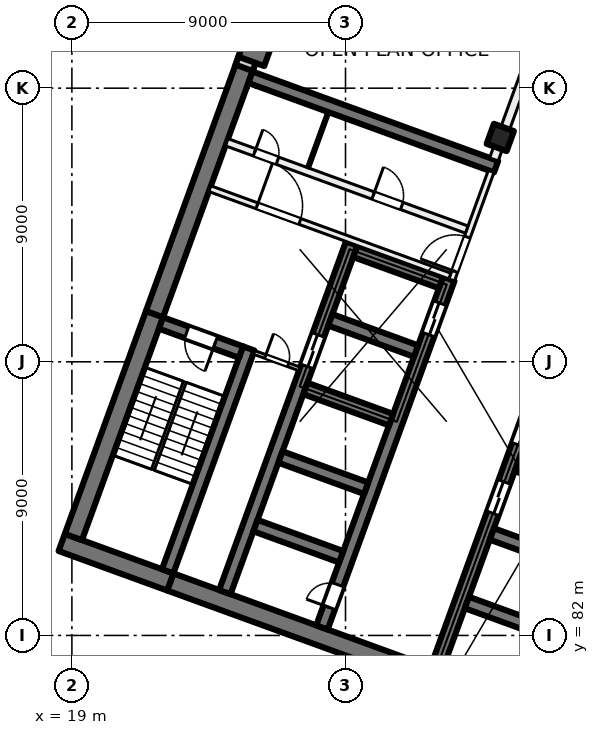
"""IFC4 building model, lengths in metres.
Left out: names, types, materials, properties, quantities, classifications, styles, units other than length and angle.
Written with IfcOpenShell. Run it as: python <this file> out.ifc"""

import sys

from ifc_helpers import new_model, si_unit, direction, frame, frame_2d, origin, origin_2d, place, context, subcontext, project, spatial, rectangle, extrude, element, fill, save


model = new_model("IFC4")
c1 = context("Model", 3, precision=1e-05, world=origin(), true_north=direction((0.0, 1.0)))
c2 = subcontext(c1, "Body", "Model", "MODEL_VIEW")
j1 = project(units=[si_unit("LENGTHUNIT", "METRE"), si_unit("PLANEANGLEUNIT", "RADIAN")], contexts=[c1])
p1 = place(None, origin())
s1 = spatial("IfcSite", under=j1, at=p1, CompositionType="ELEMENT")
p2 = place(p1, origin())
s2 = spatial("IfcBuilding", under=s1, at=p2, CompositionType="ELEMENT")
p3 = place(p2, frame((0.0, 0.0, 55.5)))
s3 = spatial("IfcBuildingStorey", under=s2, at=p3, CompositionType="ELEMENT", Elevation=55.5)
p4 = place(p3, frame((33.091, 98.379, 0.0), z_axis=(0.0, 0.0, 1.0), x_axis=(-0.342020143326, -0.939692620786, 0.0)))
e1 = element("IfcColumn", 1, at=p4, inside=s3, PredefinedType="COLUMN", context=c2, shape_type="SweptSolid", body=[
    extrude(rectangle(XDim=0.7, YDim=0.7, at=origin_2d()), origin(), (0.0, 0.0, 1.0), 4.0),
])
p5 = place(p3, frame((25.056, 101.303, 0.0), z_axis=(0.0, 0.0, 1.0), x_axis=(-0.342020143326, -0.939692620786, 0.0)))
e2 = element("IfcColumn", 2, at=p5, inside=s3, PredefinedType="COLUMN", context=c2, shape_type="SweptSolid", body=[
    extrude(rectangle(XDim=0.9, YDim=0.9, at=origin_2d()), origin(), (0.0, 0.0, 1.0), 4.0),
])
p6 = place(p3, frame((35.767, 78.835, 0.0), z_axis=(0.0, 0.0, 1.0), x_axis=(-0.939692894512, 0.342019391267, 0.0)))
e3 = element("IfcWall", 3, at=p6, inside=s3, PredefinedType="SHEAR", context=c2, shape_type="SweptSolid", body=[
    extrude(rectangle(XDim=14.4, YDim=0.6, at=frame_2d((7.2, 0.0))), origin(), (0.0, 0.0, 1.0), 4.0),
])
p7 = place(p3, frame((22.236, 83.76, 0.0), z_axis=(0.0, 0.0, 1.0), x_axis=(-0.939680822529, 0.342052557032, 0.0)))
e4 = element("IfcWall", 4, at=p7, inside=s3, PredefinedType="SHEAR", context=c2, shape_type="SweptSolid", body=[
    extrude(rectangle(XDim=3.8, YDim=0.6, at=frame_2d((1.9, 0.0))), origin(), (0.0, 0.0, 1.0), 4.0),
])
p8 = place(p3, frame((19.05, 85.239, 0.0), z_axis=(0.0, 0.0, 1.0), x_axis=(0.342016982193, 0.939693771338, 0.0)))
e5 = element("IfcWall", 5, at=p8, inside=s3, PredefinedType="SHEAR", context=c2, shape_type="SweptSolid", body=[
    extrude(rectangle(XDim=7.8, YDim=0.6, at=frame_2d((3.9, 0.0))), origin(), (0.0, 0.0, 1.0), 4.0),
])
p9 = place(p3, frame((21.717, 92.568, 0.0), z_axis=(0.0, 0.0, 1.0), x_axis=(0.342016162452, 0.939694069696, 0.0)))
e6 = element("IfcWall", 6, at=p9, inside=s3, PredefinedType="SHEAR", context=c2, shape_type="SweptSolid", body=[
    extrude(rectangle(XDim=8.9, YDim=0.6, at=frame_2d((4.45, 0.0))), origin(), (0.0, 0.0, 1.0), 4.0),
])
p10 = place(p3, frame((22.15, 84.11, 0.0), z_axis=(0.0, 0.0, 1.0), x_axis=(0.342016982193, 0.939693771338, 0.0)))
e7 = element("IfcWall", 7, at=p10, inside=s3, PredefinedType="SHEAR", context=c2, shape_type="SweptSolid", body=[
    extrude(rectangle(XDim=7.8, YDim=0.4, at=frame_2d((3.9, 0.0))), origin(), (0.0, 0.0, 1.0), 4.0),
])
p11 = place(p3, frame((24.562, 91.32, 0.0), z_axis=(0.0, 0.0, 1.0), x_axis=(-0.939717030584, 0.341953070509, 0.0)))
e8 = element("IfcWall", 8, at=p11, inside=s3, PredefinedType="SHEAR", context=c2, shape_type="SweptSolid", body=[
    extrude(rectangle(XDim=2.8, YDim=0.4, at=frame_2d((1.4, 0.0))), origin(), (0.0, 0.0, 1.0), 4.0),
])
p12 = place(p11, frame((0.9, 0.0, 0.0)))
e9 = element("IfcOpeningElement", 9, at=p12, cuts=e8, PredefinedType="OPENING", context=c2, shape_type="SweptSolid", body=[
    extrude(rectangle(XDim=1.0, YDim=2.1, at=frame_2d((0.5, 1.05))), frame((0.0, 0.21, 0.0), z_axis=(0.0, -1.0, 0.0), x_axis=(1.0, 0.0, 0.0)), (0.0, 0.0, 1.0), 0.42),
])
p13 = place(p3, frame((30.984, 80.895, 0.0), z_axis=(0.0, 0.0, 1.0), x_axis=(0.342021021735, 0.939692301071, 0.0)))
e10 = element("IfcWall", 10, at=p13, inside=s3, PredefinedType="SHEAR", context=c2, shape_type="SweptSolid", body=[
    extrude(rectangle(XDim=12.2, YDim=0.4, at=frame_2d((6.1, 0.0))), origin(), (0.0, 0.0, 1.0), 4.0),
])
p14 = place(p13, frame((5.45, 0.0, 0.0)))
e11 = element("IfcOpeningElement", 11, at=p14, cuts=e10, PredefinedType="OPENING", context=c2, shape_type="SweptSolid", body=[
    extrude(rectangle(XDim=1.1, YDim=2.1, at=frame_2d((0.55, 1.05))), frame((0.0, 0.21, 0.0), z_axis=(0.0, -1.0, 0.0), x_axis=(1.0, 0.0, 0.0)), (0.0, 0.0, 1.0), 0.42),
])
p15 = place(p13, frame((7.85, 0.0, 0.0)))
e12 = element("IfcOpeningElement", 12, at=p15, cuts=e10, PredefinedType="OPENING", context=c2, shape_type="SweptSolid", body=[
    extrude(rectangle(XDim=1.1, YDim=2.1, at=frame_2d((0.55, 1.05))), frame((0.0, 0.21, 0.0), z_axis=(0.0, -1.0, 0.0), x_axis=(1.0, 0.0, 0.0)), (0.0, 0.0, 1.0), 0.42),
])
p16 = place(p13, frame((10.25, 0.0, 0.0)))
e13 = element("IfcOpeningElement", 13, at=p16, cuts=e10, PredefinedType="OPENING", context=c2, shape_type="SweptSolid", body=[
    extrude(rectangle(XDim=1.1, YDim=2.1, at=frame_2d((0.55, 1.05))), frame((0.0, 0.21, 0.0), z_axis=(0.0, -1.0, 0.0), x_axis=(1.0, 0.0, 0.0)), (0.0, 0.0, 1.0), 0.42),
])
for number, where, z_axis, x_axis in (
    (14, (34.812, 82.056, 0.0), (0.0, 0.0, 1.0), (-0.94, 0.342, 0.0)),
    (15, (35.632, 84.311, 0.0), (0.0, 0.0, 1.0), (-0.94, 0.342, 0.0)),
    (16, (36.453, 86.566, 0.0), (0.0, 0.0, 1.0), (-0.94, 0.342, 0.0)),
):
    element("IfcWall", number, at=place(p3, frame(where, z_axis=z_axis, x_axis=x_axis)), inside=s3, PredefinedType="SHEAR", context=c2, shape_type="SweptSolid", body=[
        extrude(rectangle(XDim=3.0, YDim=0.4, at=frame_2d((1.5, 0.0))), origin(), (0.0, 0.0, 1.0), 4.0),
    ])
p17 = place(p3, frame((27.225, 82.263, 0.0), z_axis=(0.0, 0.0, 1.0), x_axis=(0.342014590177, 0.939694641948, 0.0)))
e17 = element("IfcWall", 17, at=p17, inside=s3, PredefinedType="SHEAR", context=c2, shape_type="SweptSolid", body=[
    extrude(rectangle(XDim=12.2, YDim=0.4, at=frame_2d((6.1, 0.0))), origin(), (0.0, 0.0, 1.0), 4.0),
])
p18 = place(p17, frame((10.25, 0.0, 0.0)))
e18 = element("IfcOpeningElement", 18, at=p18, cuts=e17, PredefinedType="OPENING", context=c2, shape_type="SweptSolid", body=[
    extrude(rectangle(XDim=1.1, YDim=2.1, at=frame_2d((0.55, 1.05))), frame((0.0, 0.21, 0.0), z_axis=(0.0, -1.0, 0.0), x_axis=(1.0, 0.0, 0.0)), (0.0, 0.0, 1.0), 0.42),
])
p19 = place(p17, frame((0.7, 0.0, 0.0)))
e19 = element("IfcOpeningElement", 19, at=p19, cuts=e17, PredefinedType="OPENING", context=c2, shape_type="SweptSolid", body=[
    extrude(rectangle(XDim=0.8, YDim=2.1, at=frame_2d((0.4, 1.05))), frame((0.0, 0.21, 0.0), z_axis=(0.0, -1.0, 0.0), x_axis=(1.0, 0.0, 0.0)), (0.0, 0.0, 1.0), 0.42),
])
p20 = place(p3, frame((24.03, 83.426, 0.0), z_axis=(0.0, 0.0, 1.0), x_axis=(0.342014590177, 0.939694641948, 0.0)))
e20 = element("IfcWall", 20, at=p20, inside=s3, PredefinedType="SHEAR", context=c2, shape_type="SweptSolid", body=[
    extrude(rectangle(XDim=12.2, YDim=0.4, at=frame_2d((6.1, 0.0))), origin(), (0.0, 0.0, 1.0), 4.0),
])
p21 = place(p20, frame((7.9, 0.0, 0.0)))
e21 = element("IfcOpeningElement", 21, at=p21, cuts=e20, PredefinedType="OPENING", context=c2, shape_type="SweptSolid", body=[
    extrude(rectangle(XDim=1.1, YDim=2.1, at=frame_2d((0.55, 1.05))), frame((0.0, 0.21, 0.0), z_axis=(0.0, -1.0, 0.0), x_axis=(1.0, 0.0, 0.0)), (0.0, 0.0, 1.0), 0.42),
])
p22 = place(p3, frame((27.858, 84.587, 0.0), z_axis=(0.0, 0.0, 1.0), x_axis=(-0.939686455819, 0.342037080957, 0.0)))
e22 = element("IfcWall", 22, at=p22, inside=s3, PredefinedType="SHEAR", context=c2, shape_type="SweptSolid", body=[
    extrude(rectangle(XDim=3.0, YDim=0.4, at=frame_2d((1.5, 0.0))), origin(), (0.0, 0.0, 1.0), 4.0),
])
p23 = place(p3, frame((28.678, 86.842, 0.0), z_axis=(0.0, 0.0, 1.0), x_axis=(-0.939676934218, 0.342063238742, 0.0)))
e23 = element("IfcWall", 23, at=p23, inside=s3, PredefinedType="SHEAR", context=c2, shape_type="SweptSolid", body=[
    extrude(rectangle(XDim=3.0, YDim=0.4, at=frame_2d((1.5, 0.0))), origin(), (0.0, 0.0, 1.0), 4.0),
])
for number, where, z_axis, x_axis in (
    (24, (29.5, 89.097, 0.0), (0.0, 0.0, 1.0), (-0.94, 0.342, 0.0)),
    (25, (30.32, 91.353, 0.0), (0.0, 0.0, 1.0), (-0.94, 0.342, 0.0)),
    (26, (31.141, 93.608, 0.0), (0.0, 0.0, 1.0), (-0.94, 0.342, 0.0)),
):
    element("IfcWall", number, at=place(p3, frame(where, z_axis=z_axis, x_axis=x_axis)), inside=s3, PredefinedType="SHEAR", context=c2, shape_type="SweptSolid", body=[
        extrude(rectangle(XDim=3.0, YDim=0.4, at=frame_2d((1.5, 0.0))), origin(), (0.0, 0.0, 1.0), 4.0),
    ])
p24 = place(p3, frame((32.953, 97.418, 0.0), z_axis=(0.0, 0.0, 1.0), x_axis=(-0.93969060187, 0.342025690201, 0.0)))
e27 = element("IfcWall", 27, at=p24, inside=s3, PredefinedType="SHEAR", context=c2, shape_type="SweptSolid", body=[
    extrude(rectangle(XDim=8.6, YDim=0.4, at=frame_2d((4.3, 0.0))), origin(), (0.0, 0.0, 1.0), 4.0),
])
p25 = place(p3, frame((24.666, 100.669, 0.0), z_axis=(0.0, 0.0, 1.0), x_axis=(0.34201964167, 0.939692803373, 0.0)))
e28 = element("IfcWall", 28, at=p25, inside=s3, PredefinedType="SOLIDWALL", context=c2, shape_type="SweptSolid", body=[
    extrude(rectangle(XDim=32.884, YDim=0.6, at=frame_2d((16.442, 0.0))), origin(), (0.0, 0.0, 1.0), 3.625),
])
p26 = place(p25, frame((1.48, 0.0, 0.9)))
e29 = element("IfcOpeningElement", 29, at=p26, cuts=e28, PredefinedType="OPENING", context=c2, shape_type="SweptSolid", body=[
    extrude(rectangle(XDim=3.0, YDim=2.4, at=frame_2d((1.5, 1.2))), frame((0.0, 0.31, 0.0), z_axis=(0.0, -1.0, 0.0), x_axis=(1.0, 0.0, 0.0)), (0.0, 0.0, 1.0), 0.62),
])
p27 = place(p25, frame((5.98, 0.0, 0.9)))
e30 = element("IfcOpeningElement", 30, at=p27, cuts=e28, PredefinedType="OPENING", context=c2, shape_type="SweptSolid", body=[
    extrude(rectangle(XDim=3.0, YDim=2.4, at=frame_2d((1.5, 1.2))), frame((0.0, 0.31, 0.0), z_axis=(0.0, -1.0, 0.0), x_axis=(1.0, 0.0, 0.0)), (0.0, 0.0, 1.0), 0.62),
])
p28 = place(p25, frame((10.48, 0.0, 0.9)))
e31 = element("IfcOpeningElement", 31, at=p28, cuts=e28, PredefinedType="OPENING", context=c2, shape_type="SweptSolid", body=[
    extrude(rectangle(XDim=3.0, YDim=2.4, at=frame_2d((1.5, 1.2))), frame((0.0, 0.31, 0.0), z_axis=(0.0, -1.0, 0.0), x_axis=(1.0, 0.0, 0.0)), (0.0, 0.0, 1.0), 0.62),
])
p29 = place(p25, frame((15.58, 0.0, 0.0)))
e32 = element("IfcOpeningElement", 32, at=p29, cuts=e28, PredefinedType="OPENING", context=c2, shape_type="SweptSolid", body=[
    extrude(rectangle(XDim=1.8, YDim=2.4, at=frame_2d((0.9, 1.2))), frame((0.0, 0.31, 0.0), z_axis=(0.0, -1.0, 0.0), x_axis=(1.0, 0.0, 0.0)), (0.0, 0.0, 1.0), 0.62),
])
p30 = place(p25, frame((19.48, 0.0, 0.9)))
e33 = element("IfcOpeningElement", 33, at=p30, cuts=e28, PredefinedType="OPENING", context=c2, shape_type="SweptSolid", body=[
    extrude(rectangle(XDim=3.0, YDim=2.4, at=frame_2d((1.5, 1.2))), frame((0.0, 0.31, 0.0), z_axis=(0.0, -1.0, 0.0), x_axis=(1.0, 0.0, 0.0)), (0.0, 0.0, 1.0), 0.62),
])
p31 = place(p25, frame((23.98, 0.0, 0.9)))
e34 = element("IfcOpeningElement", 34, at=p31, cuts=e28, PredefinedType="OPENING", context=c2, shape_type="SweptSolid", body=[
    extrude(rectangle(XDim=3.0, YDim=2.4, at=frame_2d((1.5, 1.2))), frame((0.0, 0.31, 0.0), z_axis=(0.0, -1.0, 0.0), x_axis=(1.0, 0.0, 0.0)), (0.0, 0.0, 1.0), 0.62),
])
p32 = place(p25, frame((29.08, 0.0, 0.0)))
e35 = element("IfcOpeningElement", 35, at=p32, cuts=e28, PredefinedType="OPENING", context=c2, shape_type="SweptSolid", body=[
    extrude(rectangle(XDim=1.8, YDim=2.4, at=frame_2d((0.9, 1.2))), frame((0.0, 0.31, 0.0), z_axis=(0.0, -1.0, 0.0), x_axis=(1.0, 0.0, 0.0)), (0.0, 0.0, 1.0), 0.62),
])
p33 = place(p3, frame((31.491, 93.693, 0.0), z_axis=(0.0, 0.0, 1.0), x_axis=(0.341995824804, 0.939701471648, 0.0)))
e36 = element("IfcWall", 36, at=p33, inside=s3, PredefinedType="PARTITIONING", context=c2, shape_type="SweptSolid", body=[
    extrude(rectangle(XDim=3.8, YDim=0.2, at=frame_2d((1.9, 0.0))), origin(), (0.0, 0.0, 1.0), 3.625),
])
p34 = place(p33, frame((0.3, 0.0, 0.0)))
e37 = element("IfcOpeningElement", 37, at=p34, cuts=e36, PredefinedType="OPENING", context=c2, shape_type="SweptSolid", body=[
    extrude(rectangle(XDim=1.2, YDim=2.1, at=frame_2d((0.6, 1.05))), frame((0.0, 0.11, 0.0), z_axis=(0.0, -1.0, 0.0), x_axis=(1.0, 0.0, 0.0)), (0.0, 0.0, 1.0), 0.22),
])
p35 = place(p3, frame((23.538, 96.694, 0.0), z_axis=(0.0, 0.0, 1.0), x_axis=(0.939691552312, -0.342023078919, 0.0)))
e38 = element("IfcWall", 38, at=p35, inside=s3, PredefinedType="PARTITIONING", context=c2, shape_type="SweptSolid", body=[
    extrude(rectangle(XDim=8.4, YDim=0.2, at=frame_2d((4.2, 0.0))), origin(), (0.0, 0.0, 1.0), 3.625),
])
p36 = place(p35, frame((1.65, 0.0, 0.0)))
e39 = element("IfcOpeningElement", 39, at=p36, cuts=e38, PredefinedType="OPENING", context=c2, shape_type="SweptSolid", body=[
    extrude(rectangle(XDim=1.5, YDim=2.1, at=frame_2d((0.75, 1.05))), frame((0.0, 0.11, 0.0), z_axis=(0.0, -1.0, 0.0), x_axis=(1.0, 0.0, 0.0)), (0.0, 0.0, 1.0), 0.22),
])
p37 = place(p3, frame((24.094, 98.221, 0.0), z_axis=(0.0, 0.0, 1.0), x_axis=(0.939691552312, -0.342023078919, 0.0)))
e40 = element("IfcWall", 40, at=p37, inside=s3, PredefinedType="PARTITIONING", context=c2, shape_type="SweptSolid", body=[
    extrude(rectangle(XDim=8.4, YDim=0.25, at=frame_2d((4.2, 0.0))), origin(), (0.0, 0.0, 1.0), 3.625),
])
p38 = place(p37, frame((5.125, 0.0, 0.0)))
e41 = element("IfcOpeningElement", 41, at=p38, cuts=e40, PredefinedType="OPENING", context=c2, shape_type="SweptSolid", body=[
    extrude(rectangle(XDim=1.0, YDim=2.1, at=frame_2d((0.5, 1.05))), frame((0.0, 0.135, 0.0), z_axis=(0.0, -1.0, 0.0), x_axis=(1.0, 0.0, 0.0)), (0.0, 0.0, 1.0), 0.27),
])
p39 = place(p37, frame((0.975, 0.0, 0.0)))
e42 = element("IfcOpeningElement", 42, at=p39, cuts=e40, PredefinedType="OPENING", context=c2, shape_type="SweptSolid", body=[
    extrude(rectangle(XDim=0.8, YDim=2.1, at=frame_2d((0.4, 1.05))), frame((0.0, 0.135, 0.0), z_axis=(0.0, -1.0, 0.0), x_axis=(1.0, 0.0, 0.0)), (0.0, 0.0, 1.0), 0.27),
])
p40 = place(p3, frame((24.985, 91.312, 0.0), z_axis=(0.0, 0.0, 1.0), x_axis=(0.939708740826, -0.341975850632, 0.0)))
e43 = element("IfcWall", 43, at=p40, inside=s3, PredefinedType="PARTITIONING", context=c2, shape_type="SweptSolid", body=[
    extrude(rectangle(XDim=1.6, YDim=0.125, at=frame_2d((0.8, 0.0))), origin(), (0.0, 0.0, 1.0), 3.625),
])
p41 = place(p40, frame((0.4, 0.0, 0.0)))
e44 = element("IfcOpeningElement", 44, at=p41, cuts=e43, PredefinedType="OPENING", context=c2, shape_type="SweptSolid", body=[
    extrude(rectangle(XDim=0.8, YDim=2.1, at=frame_2d((0.4, 1.05))), frame((0.0, 0.073, 0.0), z_axis=(0.0, -1.0, 0.0), x_axis=(1.0, 0.0, 0.0)), (0.0, 0.0, 1.0), 0.145),
])
p42 = place(p3, frame((26.768, 97.381, 0.0), z_axis=(0.0, 0.0, 1.0), x_axis=(0.342024501273, 0.939691034611, 0.0)))
e45 = element("IfcWall", 45, at=p42, inside=s3, PredefinedType="PARTITIONING", context=c2, shape_type="SweptSolid", body=[
    extrude(rectangle(XDim=1.95, YDim=0.1, at=frame_2d((0.975, 0.0))), origin(), (0.0, 0.0, 1.0), 3.625),
])
p43 = place(p3, frame((32.881, 97.657, 0.0), z_axis=(0.0, 0.0, 1.0), x_axis=(0.342017360004, 0.939693633828, 0.0)))
e46 = element("IfcWall", 46, at=p43, inside=s3, PredefinedType="PARTITIONING", context=c2, shape_type="SweptSolid", body=[
    extrude(rectangle(XDim=34.516, YDim=0.3, at=frame_2d((17.258, 0.0))), origin(), (0.0, 0.0, 1.0), 3.625),
])
p44 = place(p43, frame((12.975, 0.0, 0.0)))
e47 = element("IfcOpeningElement", 47, at=p44, cuts=e46, PredefinedType="OPENING", context=c2, shape_type="SweptSolid", body=[
    extrude(rectangle(XDim=1.8, YDim=2.1, at=frame_2d((0.9, 1.05))), frame((0.0, 0.16, 0.0), z_axis=(0.0, -1.0, 0.0), x_axis=(1.0, 0.0, 0.0)), (0.0, 0.0, 1.0), 0.32),
])
p45 = place(p18, origin())
e48 = element("IfcDoor", 48, at=p45, inside=s3, OperationType="DOUBLE_DOOR_SLIDING", PredefinedType="DOOR", context=c2, shape_type="SweptSolid", body=[
    extrude(rectangle(XDim=1.1, YDim=2.1, at=frame_2d((0.55, 1.05))), frame((0.0, 0.025, 0.0), z_axis=(0.0, -1.0, 0.0), x_axis=(1.0, 0.0, 0.0)), (0.0, 0.0, 1.0), 0.05),
])
fill(e18, e48)
p46 = place(p14, origin())
e49 = element("IfcDoor", 49, at=p46, inside=s3, OperationType="DOUBLE_DOOR_SLIDING", PredefinedType="DOOR", context=c2, shape_type="SweptSolid", body=[
    extrude(rectangle(XDim=1.1, YDim=2.1, at=frame_2d((0.55, 1.05))), frame((0.0, 0.025, 0.0), z_axis=(0.0, -1.0, 0.0), x_axis=(1.0, 0.0, 0.0)), (0.0, 0.0, 1.0), 0.05),
])
fill(e11, e49)
p47 = place(p15, origin())
e50 = element("IfcDoor", 50, at=p47, inside=s3, OperationType="DOUBLE_DOOR_SLIDING", PredefinedType="DOOR", context=c2, shape_type="SweptSolid", body=[
    extrude(rectangle(XDim=1.1, YDim=2.1, at=frame_2d((0.55, 1.05))), frame((0.0, 0.025, 0.0), z_axis=(0.0, -1.0, 0.0), x_axis=(1.0, 0.0, 0.0)), (0.0, 0.0, 1.0), 0.05),
])
fill(e12, e50)
p48 = place(p19, origin())
e51 = element("IfcDoor", 51, at=p48, inside=s3, OperationType="SINGLE_SWING_LEFT", PredefinedType="DOOR", context=c2, shape_type="SweptSolid", body=[
    extrude(rectangle(XDim=0.8, YDim=2.1, at=frame_2d((0.4, 1.05))), frame((0.0, 0.025, 0.0), z_axis=(0.0, -1.0, 0.0), x_axis=(1.0, 0.0, 0.0)), (0.0, 0.0, 1.0), 0.05),
])
fill(e19, e51)
p49 = place(p34, origin())
e52 = element("IfcDoor", 52, at=p49, inside=s3, OperationType="DOUBLE_DOOR_SINGLE_SWING", PredefinedType="DOOR", context=c2, shape_type="SweptSolid", body=[
    extrude(rectangle(XDim=1.2, YDim=2.1, at=frame_2d((0.6, 1.05))), frame((0.0, 0.025, 0.0), z_axis=(0.0, -1.0, 0.0), x_axis=(1.0, 0.0, 0.0)), (0.0, 0.0, 1.0), 0.05),
])
fill(e37, e52)
p50 = place(p36, origin())
e53 = element("IfcDoor", 53, at=p50, inside=s3, OperationType="DOUBLE_DOOR_SINGLE_SWING", PredefinedType="DOOR", context=c2, shape_type="SweptSolid", body=[
    extrude(rectangle(XDim=1.5, YDim=2.1, at=frame_2d((0.75, 1.05))), frame((0.0, 0.025, 0.0), z_axis=(0.0, -1.0, 0.0), x_axis=(1.0, 0.0, 0.0)), (0.0, 0.0, 1.0), 0.05),
])
fill(e39, e53)
p51 = place(p12, origin())
e54 = element("IfcDoor", 54, at=p51, inside=s3, OperationType="SINGLE_SWING_LEFT", PredefinedType="DOOR", context=c2, shape_type="SweptSolid", body=[
    extrude(rectangle(XDim=1.0, YDim=2.1, at=frame_2d((0.5, 1.05))), frame((0.0, 0.025, 0.0), z_axis=(0.0, -1.0, 0.0), x_axis=(1.0, 0.0, 0.0)), (0.0, 0.0, 1.0), 0.05),
])
fill(e9, e54)
p52 = place(p41, origin())
e55 = element("IfcDoor", 55, at=p52, inside=s3, OperationType="SINGLE_SWING_RIGHT", PredefinedType="DOOR", context=c2, shape_type="SweptSolid", body=[
    extrude(rectangle(XDim=0.8, YDim=2.1, at=frame_2d((0.4, 1.05))), frame((0.0, 0.025, 0.0), z_axis=(0.0, -1.0, 0.0), x_axis=(1.0, 0.0, 0.0)), (0.0, 0.0, 1.0), 0.05),
])
fill(e44, e55)
p53 = place(p38, origin())
e56 = element("IfcDoor", 56, at=p53, inside=s3, OperationType="SINGLE_SWING_LEFT", PredefinedType="DOOR", context=c2, shape_type="SweptSolid", body=[
    extrude(rectangle(XDim=1.0, YDim=2.1, at=frame_2d((0.5, 1.05))), frame((0.0, 0.025, 0.0), z_axis=(0.0, -1.0, 0.0), x_axis=(1.0, 0.0, 0.0)), (0.0, 0.0, 1.0), 0.05),
])
fill(e41, e56)
p54 = place(p39, origin())
e57 = element("IfcDoor", 57, at=p54, inside=s3, OperationType="SINGLE_SWING_RIGHT", PredefinedType="DOOR", context=c2, shape_type="SweptSolid", body=[
    extrude(rectangle(XDim=0.8, YDim=2.1, at=frame_2d((0.4, 1.05))), frame((0.0, 0.025, 0.0), z_axis=(0.0, -1.0, 0.0), x_axis=(1.0, 0.0, 0.0)), (0.0, 0.0, 1.0), 0.05),
])
fill(e42, e57)
p55 = place(p21, origin())
e58 = element("IfcDoor", 58, at=p55, inside=s3, OperationType="DOUBLE_DOOR_SLIDING", PredefinedType="DOOR", context=c2, shape_type="SweptSolid", body=[
    extrude(rectangle(XDim=1.1, YDim=2.1, at=frame_2d((0.55, 1.05))), frame((0.0, 0.025, 0.0), z_axis=(0.0, -1.0, 0.0), x_axis=(1.0, 0.0, 0.0)), (0.0, 0.0, 1.0), 0.05),
])
fill(e21, e58)
save(model, sys.argv[1])
